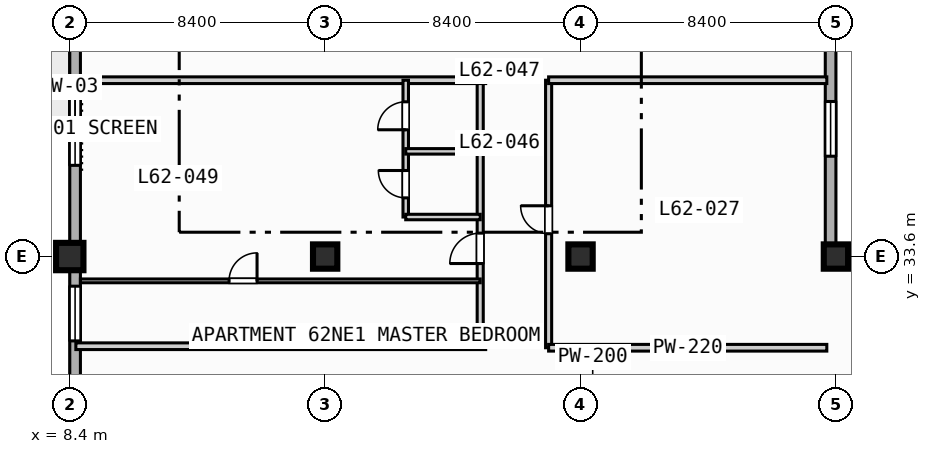
"""IFC4 building model, lengths in metres.
Left out: names, types, materials, properties, quantities, classifications, styles, units other than length and angle.
Written with IfcOpenShell. Run it as: python <this file> out.ifc"""

import sys

from ifc_helpers import new_model, si_unit, direction, frame, frame_2d, origin, origin_2d, place, context, subcontext, project, spatial, rectangle, extrude, element, fill, save


model = new_model("IFC4")
c1 = context("Model", 3, precision=1e-05, world=origin(), true_north=direction((0.0, 1.0)))
c2 = subcontext(c1, "Body", "Model", "MODEL_VIEW")
j1 = project(units=[si_unit("LENGTHUNIT", "METRE"), si_unit("PLANEANGLEUNIT", "RADIAN")], contexts=[c1])
p1 = place(None, origin())
s1 = spatial("IfcSite", under=j1, at=p1, CompositionType="ELEMENT")
p2 = place(p1, origin())
s2 = spatial("IfcBuilding", under=s1, at=p2, CompositionType="ELEMENT")
p3 = place(p2, frame((0.0, 0.0, 252.7)))
s3 = spatial("IfcBuildingStorey", under=s2, at=p3, CompositionType="ELEMENT", Elevation=252.7)
p4 = place(p3, frame((8.4, 33.6, 0.0), z_axis=(0.0, 0.0, 1.0), x_axis=(1.0, 0.0, 0.0)))
e1 = element("IfcColumn", 1, at=p4, inside=s3, PredefinedType="COLUMN", context=c2, shape_type="SweptSolid", body=[
    extrude(rectangle(XDim=0.9, YDim=0.9, at=origin_2d()), origin(), (0.0, 0.0, 1.0), 3.7),
])
for number, where, z_axis, x_axis in (
    (2, (16.8, 33.6, 0.0), (0.0, 0.0, 1.0), (1.0, 0.0, 0.0)),
    (3, (25.2, 33.6, 0.0), (0.0, 0.0, 1.0), (1.0, 0.0, 0.0)),
    (4, (33.6, 33.6, 0.0), (0.0, 0.0, 1.0), (1.0, 0.0, 0.0)),
):
    element("IfcColumn", number, at=place(p3, frame(where, z_axis=z_axis, x_axis=x_axis)), inside=s3, PredefinedType="COLUMN", context=c2, shape_type="SweptSolid", body=[
        extrude(rectangle(XDim=0.8, YDim=0.8, at=origin_2d()), origin(), (0.0, 0.0, 1.0), 3.7),
    ])
p5 = place(p3, frame((8.575, 11.575, 0.0), z_axis=(0.0, 0.0, 1.0), x_axis=(0.0, 1.0, 0.0)))
e5 = element("IfcWall", 5, at=p5, inside=s3, PredefinedType="STANDARD", context=c2, shape_type="SweptSolid", body=[
    extrude(rectangle(XDim=60.85, YDim=0.35, at=frame_2d((30.425, 0.0))), origin(), (0.0, 0.0, 1.0), 3.47),
])
p6 = place(p5, frame((33.925, 0.0, 0.0)))
e6 = element("IfcOpeningElement", 6, at=p6, cuts=e5, PredefinedType="OPENING", context=c2, shape_type="SweptSolid", body=[
    extrude(rectangle(XDim=1.4, YDim=2.2, at=frame_2d((0.7, 1.1))), frame((0.0, 0.185, 0.0), z_axis=(0.0, -1.0, 0.0), x_axis=(1.0, 0.0, 0.0)), (0.0, 0.0, 1.0), 0.37),
])
p7 = place(p5, frame((25.025, 0.0, 0.85)))
e7 = element("IfcOpeningElement", 7, at=p7, cuts=e5, PredefinedType="OPENING", context=c2, shape_type="SweptSolid", body=[
    extrude(rectangle(XDim=2.4, YDim=1.95, at=frame_2d((1.2, 0.975))), frame((0.0, 0.185, 0.0), z_axis=(0.0, -1.0, 0.0), x_axis=(1.0, 0.0, 0.0)), (0.0, 0.0, 1.0), 0.37),
])
p8 = place(p5, frame((41.825, 0.0, 0.85)))
e8 = element("IfcOpeningElement", 8, at=p8, cuts=e5, PredefinedType="OPENING", context=c2, shape_type="SweptSolid", body=[
    extrude(rectangle(XDim=2.4, YDim=1.95, at=frame_2d((1.2, 0.975))), frame((0.0, 0.185, 0.0), z_axis=(0.0, -1.0, 0.0), x_axis=(1.0, 0.0, 0.0)), (0.0, 0.0, 1.0), 0.37),
])
p9 = place(p5, frame((19.25, 0.0, 0.85)))
e9 = element("IfcOpeningElement", 9, at=p9, cuts=e5, PredefinedType="OPENING", context=c2, shape_type="SweptSolid", body=[
    extrude(rectangle(XDim=1.8, YDim=1.8, at=frame_2d((0.9, 0.9))), frame((0.0, 0.185, 0.0), z_axis=(0.0, -1.0, 0.0), x_axis=(1.0, 0.0, 0.0)), (0.0, 0.0, 1.0), 0.37),
])
p10 = place(p3, frame((33.425, 72.425, 0.0), z_axis=(0.0, 0.0, 1.0), x_axis=(0.0, -1.0, 0.0)))
e10 = element("IfcWall", 10, at=p10, inside=s3, PredefinedType="STANDARD", context=c2, shape_type="SweptSolid", body=[
    extrude(rectangle(XDim=39.0, YDim=0.35, at=frame_2d((19.5, 0.0))), origin(), (0.0, 0.0, 1.0), 3.47),
])
p11 = place(p10, frame((33.725, 0.0, 0.85)))
e11 = element("IfcOpeningElement", 11, at=p11, cuts=e10, PredefinedType="OPENING", context=c2, shape_type="SweptSolid", body=[
    extrude(rectangle(XDim=1.8, YDim=1.8, at=frame_2d((0.9, 0.9))), frame((0.0, 0.185, 0.0), z_axis=(0.0, -1.0, 0.0), x_axis=(1.0, 0.0, 0.0)), (0.0, 0.0, 1.0), 0.37),
])
p12 = place(p10, frame((8.225, 0.0, 0.85)))
e12 = element("IfcOpeningElement", 12, at=p12, cuts=e10, PredefinedType="OPENING", context=c2, shape_type="SweptSolid", body=[
    extrude(rectangle(XDim=2.4, YDim=1.95, at=frame_2d((1.2, 0.975))), frame((0.0, 0.185, 0.0), z_axis=(0.0, -1.0, 0.0), x_axis=(1.0, 0.0, 0.0)), (0.0, 0.0, 1.0), 0.37),
])
p13 = place(p3, frame((33.425, 33.425, 0.0), z_axis=(0.0, 0.0, 1.0), x_axis=(1.0, 0.0, 0.0)))
e13 = element("IfcWall", 13, at=p13, inside=s3, PredefinedType="STANDARD", context=c2, shape_type="SweptSolid", body=[
    extrude(rectangle(XDim=39.0, YDim=0.35, at=frame_2d((19.5, 0.0))), origin(), (0.0, 0.0, 1.0), 3.47),
])
p14 = place(p13, frame((12.075, 0.0, 0.0)))
e14 = element("IfcOpeningElement", 14, at=p14, cuts=e13, PredefinedType="OPENING", context=c2, shape_type="SweptSolid", body=[
    extrude(rectangle(XDim=1.4, YDim=2.2, at=frame_2d((0.7, 1.1))), frame((0.0, 0.185, 0.0), z_axis=(0.0, -1.0, 0.0), x_axis=(1.0, 0.0, 0.0)), (0.0, 0.0, 1.0), 0.37),
])
p15 = place(p3, frame((24.15, 30.6, 0.0), z_axis=(0.0, 0.0, 1.0), x_axis=(0.0, 1.0, 0.0)))
e15 = element("IfcWall", 15, at=p15, inside=s3, PredefinedType="PARTITIONING", context=c2, shape_type="SweptSolid", body=[
    extrude(rectangle(XDim=8.8, YDim=0.2, at=frame_2d((4.4, 0.0))), origin(), (0.0, 0.0, 1.0), 3.47),
])
p16 = place(p15, frame((3.75, 0.0, 0.0)))
e16 = element("IfcOpeningElement", 16, at=p16, cuts=e15, PredefinedType="OPENING", context=c2, shape_type="SweptSolid", body=[
    extrude(rectangle(XDim=0.92, YDim=2.1, at=frame_2d((0.46, 1.05))), frame((0.0, 0.11, 0.0), z_axis=(0.0, -1.0, 0.0), x_axis=(1.0, 0.0, 0.0)), (0.0, 0.0, 1.0), 0.22),
])
for number, where, z_axis, x_axis in (
    (17, (24.15, 30.6, 0.0), (0.0, 0.0, 1.0), (1.0, 0.0, 0.0)),
    (18, (24.15, 39.4, 0.0), (0.0, 0.0, 1.0), (1.0, 0.0, 0.0)),
):
    element("IfcWall", number, at=place(p3, frame(where, z_axis=z_axis, x_axis=x_axis)), inside=s3, PredefinedType="PARTITIONING", context=c2, shape_type="SweptSolid", body=[
        extrude(rectangle(XDim=9.15, YDim=0.22, at=frame_2d((4.575, 0.0))), origin(), (0.0, 0.0, 1.0), 3.47),
    ])
p17 = place(p3, frame((21.9, 30.65, 0.0), z_axis=(0.0, 0.0, 1.0), x_axis=(0.0, 1.0, 0.0)))
e19 = element("IfcWall", 19, at=p17, inside=s3, PredefinedType="PARTITIONING", context=c2, shape_type="SweptSolid", body=[
    extrude(rectangle(XDim=8.75, YDim=0.2, at=frame_2d((4.375, 0.0))), origin(), (0.0, 0.0, 1.0), 3.47),
])
p18 = place(p17, frame((2.72, 0.0, 0.0)))
e20 = element("IfcOpeningElement", 20, at=p18, cuts=e19, PredefinedType="OPENING", context=c2, shape_type="SweptSolid", body=[
    extrude(rectangle(XDim=1.0, YDim=2.15, at=frame_2d((0.5, 1.075))), frame((0.0, 0.11, 0.0), z_axis=(0.0, -1.0, 0.0), x_axis=(1.0, 0.0, 0.0)), (0.0, 0.0, 1.0), 0.22),
])
for number, where, z_axis, x_axis in (
    (21, (8.6, 30.65, 0.0), (0.0, 0.0, 1.0), (1.0, 0.0, 0.0)),
    (22, (8.6, 39.4, 0.0), (0.0, 0.0, 1.0), (1.0, 0.0, 0.0)),
):
    element("IfcWall", number, at=place(p3, frame(where, z_axis=z_axis, x_axis=x_axis)), inside=s3, PredefinedType="PARTITIONING", context=c2, shape_type="SweptSolid", body=[
        extrude(rectangle(XDim=13.48, YDim=0.22, at=frame_2d((6.74, 0.0))), origin(), (0.0, 0.0, 1.0), 3.47),
    ])
p19 = place(p3, frame((19.45, 34.9, 0.0), z_axis=(0.0, 0.0, 1.0), x_axis=(0.0, 1.0, 0.0)))
e23 = element("IfcWall", 23, at=p19, inside=s3, PredefinedType="PLUMBINGWALL", context=c2, shape_type="SweptSolid", body=[
    extrude(rectangle(XDim=4.5, YDim=0.18, at=frame_2d((2.25, 0.0))), origin(), (0.0, 0.0, 1.0), 3.47),
])
p20 = place(p19, frame((0.63, 0.0, 0.0)))
e24 = element("IfcOpeningElement", 24, at=p20, cuts=e23, PredefinedType="OPENING", context=c2, shape_type="SweptSolid", body=[
    extrude(rectangle(XDim=0.9, YDim=2.1, at=frame_2d((0.45, 1.05))), frame((0.0, 0.1, 0.0), z_axis=(0.0, -1.0, 0.0), x_axis=(1.0, 0.0, 0.0)), (0.0, 0.0, 1.0), 0.2),
])
p21 = place(p19, frame((2.87, 0.0, 0.0)))
e25 = element("IfcOpeningElement", 25, at=p21, cuts=e23, PredefinedType="OPENING", context=c2, shape_type="SweptSolid", body=[
    extrude(rectangle(XDim=0.92, YDim=2.1, at=frame_2d((0.46, 1.05))), frame((0.0, 0.1, 0.0), z_axis=(0.0, -1.0, 0.0), x_axis=(1.0, 0.0, 0.0)), (0.0, 0.0, 1.0), 0.2),
])
for number, where, z_axis, x_axis in (
    (26, (19.45, 34.9, 0.0), (0.0, 0.0, 1.0), (1.0, 0.0, 0.0)),
    (27, (19.45, 37.06, 0.0), (0.0, 0.0, 1.0), (1.0, 0.0, 0.0)),
):
    element("IfcWall", number, at=place(p3, frame(where, z_axis=z_axis, x_axis=x_axis)), inside=s3, PredefinedType="PLUMBINGWALL", context=c2, shape_type="SweptSolid", body=[
        extrude(rectangle(XDim=2.45, YDim=0.18, at=frame_2d((1.225, 0.0))), origin(), (0.0, 0.0, 1.0), 3.47),
    ])
p22 = place(p3, frame((8.75, 32.8, 0.0), z_axis=(0.0, 0.0, 1.0), x_axis=(1.0, 0.0, 0.0)))
e28 = element("IfcWall", 28, at=p22, inside=s3, PredefinedType="PARTITIONING", context=c2, shape_type="SweptSolid", body=[
    extrude(rectangle(XDim=13.15, YDim=0.125, at=frame_2d((6.575, 0.0))), origin(), (0.0, 0.0, 1.0), 3.47),
])
p23 = place(p22, frame((4.89, 0.0, 0.0)))
e29 = element("IfcOpeningElement", 29, at=p23, cuts=e28, PredefinedType="OPENING", context=c2, shape_type="SweptSolid", body=[
    extrude(rectangle(XDim=0.92, YDim=2.1, at=frame_2d((0.46, 1.05))), frame((0.0, 0.073, 0.0), z_axis=(0.0, -1.0, 0.0), x_axis=(1.0, 0.0, 0.0)), (0.0, 0.0, 1.0), 0.145),
])
p24 = place(p7, origin())
e30 = element("IfcWindow", 30, at=p24, inside=s3, PartitioningType="SINGLE_PANEL", PredefinedType="WINDOW", context=c2, shape_type="SweptSolid", body=[
    extrude(rectangle(XDim=2.4, YDim=1.95, at=frame_2d((1.2, 0.975))), frame((0.0, 0.03, 0.0), z_axis=(0.0, -1.0, 0.0), x_axis=(1.0, 0.0, 0.0)), (0.0, 0.0, 1.0), 0.06),
])
fill(e7, e30)
p25 = place(p9, origin())
e31 = element("IfcWindow", 31, at=p25, inside=s3, PartitioningType="SINGLE_PANEL", PredefinedType="WINDOW", context=c2, shape_type="SweptSolid", body=[
    extrude(rectangle(XDim=1.8, YDim=1.8, at=frame_2d((0.9, 0.9))), frame((0.0, 0.03, 0.0), z_axis=(0.0, -1.0, 0.0), x_axis=(1.0, 0.0, 0.0)), (0.0, 0.0, 1.0), 0.06),
])
fill(e9, e31)
p26 = place(p11, origin())
e32 = element("IfcWindow", 32, at=p26, inside=s3, PartitioningType="SINGLE_PANEL", PredefinedType="WINDOW", context=c2, shape_type="SweptSolid", body=[
    extrude(rectangle(XDim=1.8, YDim=1.8, at=frame_2d((0.9, 0.9))), frame((0.0, 0.03, 0.0), z_axis=(0.0, -1.0, 0.0), x_axis=(1.0, 0.0, 0.0)), (0.0, 0.0, 1.0), 0.06),
])
fill(e11, e32)
p27 = place(p16, origin())
e33 = element("IfcDoor", 33, at=p27, inside=s3, OperationType="SINGLE_SWING_RIGHT", PredefinedType="DOOR", context=c2, shape_type="SweptSolid", body=[
    extrude(rectangle(XDim=0.92, YDim=2.1, at=frame_2d((0.46, 1.05))), frame((0.0, 0.025, 0.0), z_axis=(0.0, -1.0, 0.0), x_axis=(1.0, 0.0, 0.0)), (0.0, 0.0, 1.0), 0.05),
])
fill(e16, e33)
p28 = place(p18, origin())
e34 = element("IfcDoor", 34, at=p28, inside=s3, OperationType="SINGLE_SWING_LEFT", PredefinedType="DOOR", context=c2, shape_type="SweptSolid", body=[
    extrude(rectangle(XDim=1.0, YDim=2.15, at=frame_2d((0.5, 1.075))), frame((0.0, 0.025, 0.0), z_axis=(0.0, -1.0, 0.0), x_axis=(1.0, 0.0, 0.0)), (0.0, 0.0, 1.0), 0.05),
])
fill(e20, e34)
p29 = place(p20, origin())
e35 = element("IfcDoor", 35, at=p29, inside=s3, OperationType="SINGLE_SWING_RIGHT", PredefinedType="DOOR", context=c2, shape_type="SweptSolid", body=[
    extrude(rectangle(XDim=0.9, YDim=2.1, at=frame_2d((0.45, 1.05))), frame((0.0, 0.025, 0.0), z_axis=(0.0, -1.0, 0.0), x_axis=(1.0, 0.0, 0.0)), (0.0, 0.0, 1.0), 0.05),
])
fill(e24, e35)
p30 = place(p21, origin())
e36 = element("IfcDoor", 36, at=p30, inside=s3, OperationType="SINGLE_SWING_LEFT", PredefinedType="DOOR", context=c2, shape_type="SweptSolid", body=[
    extrude(rectangle(XDim=0.92, YDim=2.1, at=frame_2d((0.46, 1.05))), frame((0.0, 0.025, 0.0), z_axis=(0.0, -1.0, 0.0), x_axis=(1.0, 0.0, 0.0)), (0.0, 0.0, 1.0), 0.05),
])
fill(e25, e36)
p31 = place(p23, origin())
e37 = element("IfcDoor", 37, at=p31, inside=s3, OperationType="SINGLE_SWING_RIGHT", PredefinedType="DOOR", context=c2, shape_type="SweptSolid", body=[
    extrude(rectangle(XDim=0.92, YDim=2.1, at=frame_2d((0.46, 1.05))), frame((0.0, 0.025, 0.0), z_axis=(0.0, -1.0, 0.0), x_axis=(1.0, 0.0, 0.0)), (0.0, 0.0, 1.0), 0.05),
])
fill(e29, e37)
save(model, sys.argv[1])
